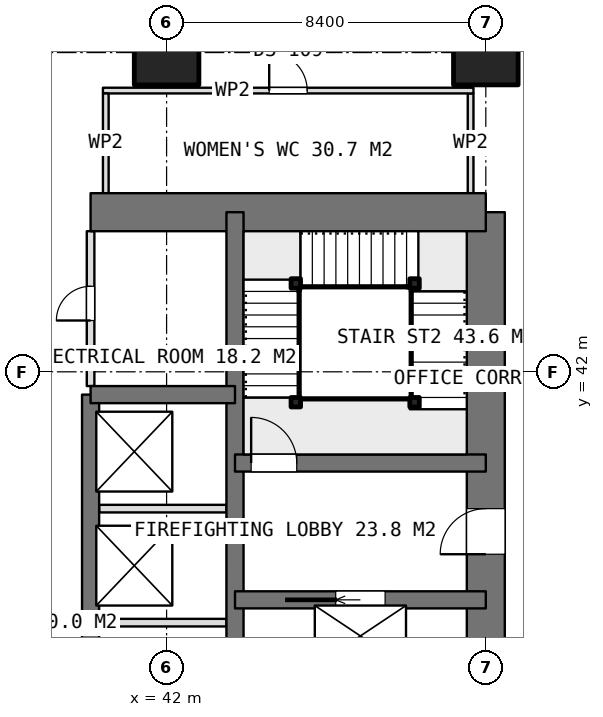
"""IFC4 building model, lengths in metres.
Left out: names, types, materials, properties, quantities, classifications, styles, units other than length and angle.
Written with IfcOpenShell. Run it as: python <this file> out.ifc"""

import sys

from ifc_helpers import new_model, si_unit, direction, frame, frame_2d, origin, origin_2d, place, context, subcontext, project, spatial, rectangle, extrude, element, fill, save


model = new_model("IFC4")
c1 = context("Model", 3, precision=1e-05, world=origin(), true_north=direction((0.0, 1.0)))
c2 = subcontext(c1, "Body", "Model", "MODEL_VIEW")
j1 = project(units=[si_unit("LENGTHUNIT", "METRE"), si_unit("PLANEANGLEUNIT", "RADIAN")], contexts=[c1])
p1 = place(None, origin())
s1 = spatial("IfcSite", under=j1, at=p1, CompositionType="ELEMENT")
p2 = place(p1, origin())
s2 = spatial("IfcBuilding", under=s1, at=p2, CompositionType="ELEMENT")
p3 = place(p2, frame((0.0, 0.0, 102.8)))
s3 = spatial("IfcBuildingStorey", under=s2, at=p3, CompositionType="ELEMENT", Elevation=102.8)
p4 = place(p3, frame((40.0, 46.2, 0.0), z_axis=(0.0, 0.0, 1.0), x_axis=(1.0, 0.0, 0.0)))
e1 = element("IfcWall", 1, at=p4, inside=s3, PredefinedType="SHEAR", context=c2, shape_type="SweptSolid", body=[
    extrude(rectangle(XDim=10.4, YDim=1.0, at=frame_2d((5.2, 0.0))), origin(), (0.0, 0.0, 1.0), 3.75),
])
p5 = place(p3, frame((50.4, 21.0, 0.0), z_axis=(0.0, 0.0, 1.0), x_axis=(0.0, 1.0, 0.0)))
e2 = element("IfcWall", 2, at=p5, inside=s3, PredefinedType="SHEAR", context=c2, shape_type="SweptSolid", body=[
    extrude(rectangle(XDim=25.2, YDim=1.0, at=frame_2d((12.6, 0.0))), origin(), (0.0, 0.0, 1.0), 3.75),
])
p6 = place(p5, frame((16.2, 0.0, 0.0)))
e3 = element("IfcOpeningElement", 3, at=p6, cuts=e2, PredefinedType="OPENING", context=c2, shape_type="SweptSolid", body=[
    extrude(rectangle(XDim=1.2, YDim=2.1, at=frame_2d((0.6, 1.05))), frame((0.0, 0.51, 0.0), z_axis=(0.0, -1.0, 0.0), x_axis=(1.0, 0.0, 0.0)), (0.0, 0.0, 1.0), 1.02),
])
p7 = place(p5, frame((10.05, 0.0, 0.0)))
e4 = element("IfcOpeningElement", 4, at=p7, cuts=e2, PredefinedType="OPENING", context=c2, shape_type="SweptSolid", body=[
    extrude(rectangle(XDim=0.9, YDim=2.1, at=frame_2d((0.45, 1.05))), frame((0.0, 0.51, 0.0), z_axis=(0.0, -1.0, 0.0), x_axis=(1.0, 0.0, 0.0)), (0.0, 0.0, 1.0), 1.02),
])
p8 = place(p5, frame((7.45, 0.0, 0.0)))
e5 = element("IfcOpeningElement", 5, at=p8, cuts=e2, PredefinedType="OPENING", context=c2, shape_type="SweptSolid", body=[
    extrude(rectangle(XDim=0.9, YDim=2.1, at=frame_2d((0.45, 1.05))), frame((0.0, 0.51, 0.0), z_axis=(0.0, -1.0, 0.0), x_axis=(1.0, 0.0, 0.0)), (0.0, 0.0, 1.0), 1.02),
])
p9 = place(p5, frame((0.7, 0.0, 0.0)))
e6 = element("IfcOpeningElement", 6, at=p9, cuts=e2, PredefinedType="OPENING", context=c2, shape_type="SweptSolid", body=[
    extrude(rectangle(XDim=1.2, YDim=2.1, at=frame_2d((0.6, 1.05))), frame((0.0, 0.51, 0.0), z_axis=(0.0, -1.0, 0.0), x_axis=(1.0, 0.0, 0.0)), (0.0, 0.0, 1.0), 1.02),
])
p10 = place(p3, frame((43.8, 21.0, 0.0), z_axis=(0.0, 0.0, 1.0), x_axis=(0.0, 1.0, 0.0)))
e7 = element("IfcWall", 7, at=p10, inside=s3, PredefinedType="SHEAR", context=c2, shape_type="SweptSolid", body=[
    extrude(rectangle(XDim=25.2, YDim=0.45, at=frame_2d((12.6, 0.0))), origin(), (0.0, 0.0, 1.0), 3.75),
])
p11 = place(p3, frame((40.0, 23.4, 0.0), z_axis=(0.0, 0.0, 1.0), x_axis=(0.0, 1.0, 0.0)))
e8 = element("IfcWall", 8, at=p11, inside=s3, PredefinedType="SHEAR", context=c2, shape_type="SweptSolid", body=[
    extrude(rectangle(XDim=18.0, YDim=0.45, at=frame_2d((9.0, 0.0))), origin(), (0.0, 0.0, 1.0), 3.75),
])
p12 = place(p11, frame((2.55, 0.0, 0.0)))
e9 = element("IfcOpeningElement", 9, at=p12, cuts=e8, PredefinedType="OPENING", context=c2, shape_type="SweptSolid", body=[
    extrude(rectangle(XDim=0.9, YDim=2.1, at=frame_2d((0.45, 1.05))), frame((0.0, 0.235, 0.0), z_axis=(0.0, -1.0, 0.0), x_axis=(1.0, 0.0, 0.0)), (0.0, 0.0, 1.0), 0.47),
])
p13 = place(p3, frame((40.0, 41.4, 0.0), z_axis=(0.0, 0.0, 1.0), x_axis=(1.0, 0.0, 0.0)))
e10 = element("IfcWall", 10, at=p13, inside=s3, PredefinedType="SHEAR", context=c2, shape_type="SweptSolid", body=[
    extrude(rectangle(XDim=3.8, YDim=0.45, at=frame_2d((1.9, 0.0))), origin(), (0.0, 0.0, 1.0), 3.75),
])
p14 = place(p3, frame((43.8, 36.0, 0.0), z_axis=(0.0, 0.0, 1.0), x_axis=(1.0, 0.0, 0.0)))
e11 = element("IfcWall", 11, at=p14, inside=s3, PredefinedType="SHEAR", context=c2, shape_type="SweptSolid", body=[
    extrude(rectangle(XDim=6.6, YDim=0.45, at=frame_2d((3.3, 0.0))), origin(), (0.0, 0.0, 1.0), 3.75),
])
p15 = place(p14, frame((2.65, 0.0, 0.0)))
e12 = element("IfcOpeningElement", 12, at=p15, cuts=e11, PredefinedType="OPENING", context=c2, shape_type="SweptSolid", body=[
    extrude(rectangle(XDim=1.3, YDim=2.1, at=frame_2d((0.65, 1.05))), frame((0.0, 0.235, 0.0), z_axis=(0.0, -1.0, 0.0), x_axis=(1.0, 0.0, 0.0)), (0.0, 0.0, 1.0), 0.47),
])
p16 = place(p3, frame((43.8, 39.6, 0.0), z_axis=(0.0, 0.0, 1.0), x_axis=(1.0, 0.0, 0.0)))
e13 = element("IfcWall", 13, at=p16, inside=s3, PredefinedType="SHEAR", context=c2, shape_type="SweptSolid", body=[
    extrude(rectangle(XDim=6.6, YDim=0.45, at=frame_2d((3.3, 0.0))), origin(), (0.0, 0.0, 1.0), 3.75),
])
p17 = place(p16, frame((0.425, 0.0, 0.0)))
e14 = element("IfcOpeningElement", 14, at=p17, cuts=e13, PredefinedType="OPENING", context=c2, shape_type="SweptSolid", body=[
    extrude(rectangle(XDim=1.2, YDim=2.1, at=frame_2d((0.6, 1.05))), frame((0.0, 0.235, 0.0), z_axis=(0.0, -1.0, 0.0), x_axis=(1.0, 0.0, 0.0)), (0.0, 0.0, 1.0), 0.47),
])
for number, where, z_axis, x_axis in (
    (15, (42.0, 50.4, 0.0), (0.0, 0.0, 1.0), (1.0, 0.0, 0.0)),
    (16, (50.4, 50.4, 0.0), (0.0, 0.0, 1.0), (1.0, 0.0, 0.0)),
):
    element("IfcColumn", number, at=place(p3, frame(where, z_axis=z_axis, x_axis=x_axis)), inside=s3, PredefinedType="COLUMN", context=c2, shape_type="SweptSolid", body=[
        extrude(rectangle(XDim=1.7, YDim=1.7, at=origin_2d()), origin(), (0.0, 0.0, 1.0), 3.75),
    ])
for number, where, z_axis, x_axis in (
    (17, (40.225, 35.4, 0.0), (0.0, 0.0, 1.0), (1.0, 0.0, 0.0)),
    (18, (40.225, 38.4, 0.0), (0.0, 0.0, 1.0), (1.0, 0.0, 0.0)),
):
    element("IfcWall", number, at=place(p3, frame(where, z_axis=z_axis, x_axis=x_axis)), inside=s3, PredefinedType="PARTITIONING", context=c2, shape_type="SweptSolid", body=[
        extrude(rectangle(XDim=3.35, YDim=0.2, at=frame_2d((1.675, 0.0))), origin(), (0.0, 0.0, 1.0), 3.5),
    ])
p18 = place(p3, frame((40.0, 41.625, 0.0), z_axis=(0.0, 0.0, 1.0), x_axis=(0.0, 1.0, 0.0)))
e19 = element("IfcWall", 19, at=p18, inside=s3, PredefinedType="PARTITIONING", context=c2, shape_type="SweptSolid", body=[
    extrude(rectangle(XDim=4.075, YDim=0.2, at=frame_2d((2.038, 0.0))), origin(), (0.0, 0.0, 1.0), 3.5),
])
p19 = place(p18, frame((1.725, 0.0, 0.0)))
e20 = element("IfcOpeningElement", 20, at=p19, cuts=e19, PredefinedType="OPENING", context=c2, shape_type="SweptSolid", body=[
    extrude(rectangle(XDim=0.9, YDim=2.1, at=frame_2d((0.45, 1.05))), frame((0.0, 0.11, 0.0), z_axis=(0.0, -1.0, 0.0), x_axis=(1.0, 0.0, 0.0)), (0.0, 0.0, 1.0), 0.22),
])
p20 = place(p3, frame((40.325, 49.4, 0.0), z_axis=(0.0, 0.0, 1.0), x_axis=(1.0, 0.0, 0.0)))
e21 = element("IfcWall", 21, at=p20, inside=s3, PredefinedType="PARTITIONING", context=c2, shape_type="SweptSolid", body=[
    extrude(rectangle(XDim=9.75, YDim=0.15, at=frame_2d((4.875, 0.0))), origin(), (0.0, 0.0, 1.0), 3.5),
])
p21 = place(p20, frame((4.375, 0.0, 0.0)))
e22 = element("IfcOpeningElement", 22, at=p21, cuts=e21, PredefinedType="OPENING", context=c2, shape_type="SweptSolid", body=[
    extrude(rectangle(XDim=1.0, YDim=2.1, at=frame_2d((0.5, 1.05))), frame((0.0, 0.085, 0.0), z_axis=(0.0, -1.0, 0.0), x_axis=(1.0, 0.0, 0.0)), (0.0, 0.0, 1.0), 0.17),
])
for number, where, z_axis, x_axis in (
    (23, (40.4, 46.7, 0.0), (0.0, 0.0, 1.0), (0.0, 1.0, 0.0)),
    (24, (50.0, 46.7, 0.0), (0.0, 0.0, 1.0), (0.0, 1.0, 0.0)),
):
    element("IfcWall", number, at=place(p3, frame(where, z_axis=z_axis, x_axis=x_axis)), inside=s3, PredefinedType="PARTITIONING", context=c2, shape_type="SweptSolid", body=[
        extrude(rectangle(XDim=2.625, YDim=0.15, at=frame_2d((1.312, 0.0))), origin(), (0.0, 0.0, 1.0), 3.5),
    ])
for number, where, z_axis, x_axis in (
    (25, (45.4, 41.2, 0.0), (0.0, 0.0, 1.0), (1.0, 0.0, 0.0)),
    (26, (45.4, 44.325, 0.0), (0.0, 0.0, 1.0), (1.0, 0.0, 0.0)),
    (27, (48.525, 44.325, 0.0), (0.0, 0.0, 1.0), (1.0, 0.0, 0.0)),
    (28, (48.525, 41.2, 0.0), (0.0, 0.0, 1.0), (1.0, 0.0, 0.0)),
):
    element("IfcColumn", number, at=place(p3, frame(where, z_axis=z_axis, x_axis=x_axis)), inside=s3, PredefinedType="COLUMN", context=c2, shape_type="SweptSolid", body=[
        extrude(rectangle(XDim=0.25, YDim=0.25, at=origin_2d()), origin(), (0.0, 0.0, 1.0), 3.75),
    ])
p22 = place(p6, origin())
e29 = element("IfcDoor", 29, at=p22, inside=s3, OperationType="SINGLE_SWING_LEFT", PredefinedType="DOOR", context=c2, shape_type="SweptSolid", body=[
    extrude(rectangle(XDim=1.2, YDim=2.1, at=frame_2d((0.6, 1.05))), frame((0.0, 0.025, 0.0), z_axis=(0.0, -1.0, 0.0), x_axis=(1.0, 0.0, 0.0)), (0.0, 0.0, 1.0), 0.05),
])
fill(e3, e29)
p23 = place(p19, origin())
e30 = element("IfcDoor", 30, at=p23, inside=s3, OperationType="SINGLE_SWING_LEFT", PredefinedType="DOOR", context=c2, shape_type="SweptSolid", body=[
    extrude(rectangle(XDim=0.9, YDim=2.1, at=frame_2d((0.45, 1.05))), frame((0.0, 0.025, 0.0), z_axis=(0.0, -1.0, 0.0), x_axis=(1.0, 0.0, 0.0)), (0.0, 0.0, 1.0), 0.05),
])
fill(e20, e30)
p24 = place(p15, origin())
e31 = element("IfcDoor", 31, at=p24, inside=s3, OperationType="SLIDING_TO_LEFT", PredefinedType="USERDEFINED", context=c2, shape_type="SweptSolid", body=[
    extrude(rectangle(XDim=1.3, YDim=2.1, at=frame_2d((0.65, 1.05))), frame((0.0, 0.025, 0.0), z_axis=(0.0, -1.0, 0.0), x_axis=(1.0, 0.0, 0.0)), (0.0, 0.0, 1.0), 0.05),
])
fill(e12, e31)
p25 = place(p21, origin())
e32 = element("IfcDoor", 32, at=p25, inside=s3, OperationType="SINGLE_SWING_LEFT", PredefinedType="DOOR", context=c2, shape_type="SweptSolid", body=[
    extrude(rectangle(XDim=1.0, YDim=2.1, at=frame_2d((0.5, 1.05))), frame((0.0, 0.025, 0.0), z_axis=(0.0, -1.0, 0.0), x_axis=(1.0, 0.0, 0.0)), (0.0, 0.0, 1.0), 0.05),
])
fill(e22, e32)
p26 = place(p17, origin())
e33 = element("IfcDoor", 33, at=p26, inside=s3, OperationType="SINGLE_SWING_RIGHT", PredefinedType="DOOR", context=c2, shape_type="SweptSolid", body=[
    extrude(rectangle(XDim=1.2, YDim=2.1, at=frame_2d((0.6, 1.05))), frame((0.0, 0.025, 0.0), z_axis=(0.0, -1.0, 0.0), x_axis=(1.0, 0.0, 0.0)), (0.0, 0.0, 1.0), 0.05),
])
fill(e14, e33)
save(model, sys.argv[1])
